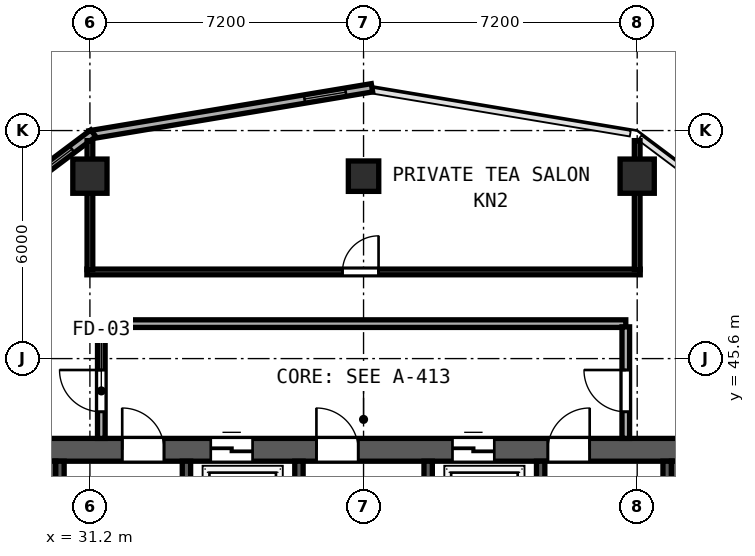
"""IFC4 building model, lengths in metres.
Left out: names, types, materials, properties, quantities, classifications, styles, units other than length and angle.
Written with IfcOpenShell. Run it as: python <this file> out.ifc"""

import sys

from ifc_helpers import new_model, si_unit, direction, frame, frame_2d, origin, origin_2d, place, context, subcontext, project, spatial, rectangle, hollow_rectangle, extrude, element, fill, save


model = new_model("IFC4")
c1 = context("Model", 3, precision=1e-05, world=origin(), true_north=direction((0.0, 1.0)))
c2 = subcontext(c1, "Body", "Model", "MODEL_VIEW")
j1 = project(units=[si_unit("LENGTHUNIT", "METRE"), si_unit("PLANEANGLEUNIT", "RADIAN")], contexts=[c1])
p1 = place(None, origin())
s1 = spatial("IfcSite", under=j1, at=p1, CompositionType="ELEMENT")
p2 = place(p1, origin())
s2 = spatial("IfcBuilding", under=s1, at=p2, CompositionType="ELEMENT")
p3 = place(p2, frame((0.0, 0.0, 199.4)))
s3 = spatial("IfcBuildingStorey", under=s2, at=p3, CompositionType="ELEMENT", Elevation=199.4)
p4 = place(p3, frame((29.7, 43.2, 0.0), z_axis=(0.0, 0.0, 1.0), x_axis=(1.0, 0.0, 0.0)))
e1 = element("IfcWall", 1, at=p4, inside=s3, PredefinedType="SHEAR", context=c2, shape_type="SweptSolid", body=[
    extrude(rectangle(XDim=17.4, YDim=0.6, at=frame_2d((8.7, 0.0))), origin(), (0.0, 0.0, 1.0), 3.62),
])
p5 = place(p4, frame((2.35, 0.0, 0.0)))
e2 = element("IfcOpeningElement", 2, at=p5, cuts=e1, PredefinedType="OPENING", context=c2, shape_type="SweptSolid", body=[
    extrude(rectangle(XDim=1.1, YDim=2.15, at=frame_2d((0.55, 1.075))), frame((0.0, 0.31, 0.0), z_axis=(0.0, -1.0, 0.0), x_axis=(1.0, 0.0, 0.0)), (0.0, 0.0, 1.0), 0.62),
])
p6 = place(p4, frame((7.46, 0.0, 0.0)))
e3 = element("IfcOpeningElement", 3, at=p6, cuts=e1, PredefinedType="OPENING", context=c2, shape_type="SweptSolid", body=[
    extrude(rectangle(XDim=1.1, YDim=2.15, at=frame_2d((0.55, 1.075))), frame((0.0, 0.31, 0.0), z_axis=(0.0, -1.0, 0.0), x_axis=(1.0, 0.0, 0.0)), (0.0, 0.0, 1.0), 0.62),
])
p7 = place(p4, frame((13.55, 0.0, 0.0)))
e4 = element("IfcOpeningElement", 4, at=p7, cuts=e1, PredefinedType="OPENING", context=c2, shape_type="SweptSolid", body=[
    extrude(rectangle(XDim=1.1, YDim=2.15, at=frame_2d((0.55, 1.075))), frame((0.0, 0.31, 0.0), z_axis=(0.0, -1.0, 0.0), x_axis=(1.0, 0.0, 0.0)), (0.0, 0.0, 1.0), 0.62),
])
p8 = place(p4, frame((4.68, 0.0, 0.0)))
e5 = element("IfcOpeningElement", 5, at=p8, cuts=e1, PredefinedType="OPENING", context=c2, shape_type="SweptSolid", body=[
    extrude(rectangle(XDim=1.1, YDim=2.2, at=frame_2d((0.55, 1.1))), frame((0.0, 0.31, 0.0), z_axis=(0.0, -1.0, 0.0), x_axis=(1.0, 0.0, 0.0)), (0.0, 0.0, 1.0), 0.62),
])
p9 = place(p4, frame((11.04, 0.0, 0.0)))
e6 = element("IfcOpeningElement", 6, at=p9, cuts=e1, PredefinedType="OPENING", context=c2, shape_type="SweptSolid", body=[
    extrude(rectangle(XDim=1.1, YDim=2.2, at=frame_2d((0.55, 1.1))), frame((0.0, 0.31, 0.0), z_axis=(0.0, -1.0, 0.0), x_axis=(1.0, 0.0, 0.0)), (0.0, 0.0, 1.0), 0.62),
])
for number, where, z_axis, x_axis in (
    (7, (30.0, 32.8, 0.0), (0.0, 0.0, 1.0), (0.0, 1.0, 0.0)),
    (8, (46.8, 32.8, 0.0), (0.0, 0.0, 1.0), (0.0, 1.0, 0.0)),
):
    element("IfcWall", number, at=place(p3, frame(where, z_axis=z_axis, x_axis=x_axis)), inside=s3, PredefinedType="SHEAR", context=c2, shape_type="SweptSolid", body=[
        extrude(rectangle(XDim=10.1, YDim=0.6, at=frame_2d((5.05, 0.0))), origin(), (0.0, 0.0, 1.0), 3.62),
    ])
for number, where, z_axis, x_axis in (
    (9, (30.412, 35.39, 0.0), (0.0, 0.0, 1.0), (0.0, 1.0, 0.0)),
    (10, (33.74, 35.39, 0.0), (0.0, 0.0, 1.0), (0.0, 1.0, 0.0)),
    (11, (36.7, 35.39, 0.0), (0.0, 0.0, 1.0), (0.0, 1.0, 0.0)),
    (12, (40.1, 35.39, 0.0), (0.0, 0.0, 1.0), (0.0, 1.0, 0.0)),
    (13, (43.06, 35.39, 0.0), (0.0, 0.0, 1.0), (0.0, 1.0, 0.0)),
    (14, (46.388, 35.39, 0.0), (0.0, 0.0, 1.0), (0.0, 1.0, 0.0)),
):
    element("IfcWall", number, at=place(p3, frame(where, z_axis=z_axis, x_axis=x_axis)), inside=s3, PredefinedType="SHEAR", context=c2, shape_type="SweptSolid", body=[
        extrude(rectangle(XDim=7.51, YDim=0.22, at=frame_2d((3.755, 0.0))), origin(), (0.0, 0.0, 1.0), 3.62),
    ])
for number, where, z_axis, x_axis in (
    (15, (31.2, 50.4, 0.0), (0.0, 0.0, 1.0), (1.0, 0.0, 0.0)),
    (16, (45.6, 50.4, 0.0), (0.0, 0.0, 1.0), (1.0, 0.0, 0.0)),
):
    element("IfcColumn", number, at=place(p3, frame(where, z_axis=z_axis, x_axis=x_axis)), inside=s3, PredefinedType="COLUMN", context=c2, shape_type="SweptSolid", body=[
        extrude(hollow_rectangle(XDim=0.9, YDim=0.9, WallThickness=0.034, at=origin_2d()), origin(), (0.0, 0.0, 1.0), 3.8),
    ])
p10 = place(p3, frame((38.4, 50.4, 0.0), z_axis=(0.0, 0.0, 1.0), x_axis=(1.0, 0.0, 0.0)))
e17 = element("IfcColumn", 17, at=p10, inside=s3, PredefinedType="COLUMN", context=c2, shape_type="SweptSolid", body=[
    extrude(hollow_rectangle(XDim=0.8, YDim=0.8, WallThickness=0.03, at=origin_2d()), origin(), (0.0, 0.0, 1.0), 3.8),
])
p11 = place(p3, frame((38.622, 52.726, 0.0), z_axis=(0.0, 0.0, 1.0), x_axis=(-0.986390420428, -0.164420006349, 0.0)))
e18 = element("IfcWall", 18, at=p11, inside=s3, PredefinedType="SOLIDWALL", context=c2, shape_type="SweptSolid", body=[
    extrude(rectangle(XDim=7.534, YDim=0.22, at=frame_2d((3.767, 0.0))), origin(), (0.0, 0.0, 1.0), 3.62),
])
p12 = place(p11, frame((0.7, 0.0, 0.85)))
e19 = element("IfcOpeningElement", 19, at=p12, cuts=e18, PredefinedType="OPENING", context=c2, shape_type="SweptSolid", body=[
    extrude(rectangle(XDim=1.1, YDim=1.75, at=frame_2d((0.55, 0.875))), frame((0.0, 0.12, 0.0), z_axis=(0.0, -1.0, 0.0), x_axis=(1.0, 0.0, 0.0)), (0.0, 0.0, 1.0), 0.24),
])
p13 = place(p3, frame((31.289, 51.529, 0.0), z_axis=(0.0, 0.0, 1.0), x_axis=(-0.800014580093, -0.599980559383, 0.0)))
e20 = element("IfcWall", 20, at=p13, inside=s3, PredefinedType="SOLIDWALL", context=c2, shape_type="SweptSolid", body=[
    extrude(rectangle(XDim=6.028, YDim=0.22, at=frame_2d((3.014, 0.0))), origin(), (0.0, 0.0, 1.0), 3.62),
])
p14 = place(p13, frame((0.7, 0.0, 0.85)))
e21 = element("IfcOpeningElement", 21, at=p14, cuts=e20, PredefinedType="OPENING", context=c2, shape_type="SweptSolid", body=[
    extrude(rectangle(XDim=1.1, YDim=1.75, at=frame_2d((0.55, 0.875))), frame((0.0, 0.12, 0.0), z_axis=(0.0, -1.0, 0.0), x_axis=(1.0, 0.0, 0.0)), (0.0, 0.0, 1.0), 0.24),
])
p15 = place(p3, frame((31.5, 46.52, 0.0), z_axis=(0.0, 0.0, 1.0), x_axis=(1.0, 0.0, 0.0)))
e22 = element("IfcWall", 22, at=p15, inside=s3, PredefinedType="SOLIDWALL", context=c2, shape_type="SweptSolid", body=[
    extrude(rectangle(XDim=13.8, YDim=0.2, at=frame_2d((6.9, 0.0))), origin(), (0.0, 0.0, 1.0), 3.62),
])
p16 = place(p3, frame((31.5, 43.5, 0.0), z_axis=(0.0, 0.0, 1.0), x_axis=(0.0, 1.0, 0.0)))
e23 = element("IfcWall", 23, at=p16, inside=s3, PredefinedType="SOLIDWALL", context=c2, shape_type="SweptSolid", body=[
    extrude(rectangle(XDim=2.935, YDim=0.2, at=frame_2d((1.468, 0.0))), origin(), (0.0, 0.0, 1.0), 3.62),
])
p17 = place(p16, frame((1.8, 0.0, 0.0), z_axis=(0.0, 0.0, 1.0), x_axis=(-1.0, 0.0, 0.0)))
e24 = element("IfcOpeningElement", 24, at=p17, cuts=e23, PredefinedType="OPENING", context=c2, shape_type="SweptSolid", body=[
    extrude(rectangle(XDim=1.1, YDim=2.15, at=frame_2d((0.55, 1.075))), frame((0.0, 0.11, 0.0), z_axis=(0.0, -1.0, 0.0), x_axis=(1.0, 0.0, 0.0)), (0.0, 0.0, 1.0), 0.22),
])
p18 = place(p3, frame((45.3, 43.5, 0.0), z_axis=(0.0, 0.0, 1.0), x_axis=(0.0, 1.0, 0.0)))
e25 = element("IfcWall", 25, at=p18, inside=s3, PredefinedType="SOLIDWALL", context=c2, shape_type="SweptSolid", body=[
    extrude(rectangle(XDim=2.935, YDim=0.2, at=frame_2d((1.468, 0.0))), origin(), (0.0, 0.0, 1.0), 3.62),
])
p19 = place(p18, frame((0.7, 0.0, 0.0)))
e26 = element("IfcOpeningElement", 26, at=p19, cuts=e25, PredefinedType="OPENING", context=c2, shape_type="SweptSolid", body=[
    extrude(rectangle(XDim=1.1, YDim=2.15, at=frame_2d((0.55, 1.075))), frame((0.0, 0.11, 0.0), z_axis=(0.0, -1.0, 0.0), x_axis=(1.0, 0.0, 0.0)), (0.0, 0.0, 1.0), 0.22),
])
p20 = place(p3, frame((31.12, 47.88, 0.0), z_axis=(0.0, 0.0, 1.0), x_axis=(1.0, 0.0, 0.0)))
e27 = element("IfcWall", 27, at=p20, inside=s3, PredefinedType="PARTITIONING", context=c2, shape_type="SweptSolid", body=[
    extrude(rectangle(XDim=14.56, YDim=0.15, at=frame_2d((7.28, 0.0))), origin(), (0.0, 0.0, 1.0), 3.62),
])
p21 = place(p20, frame((6.725, 0.0, 0.0)))
e28 = element("IfcOpeningElement", 28, at=p21, cuts=e27, PredefinedType="OPENING", context=c2, shape_type="SweptSolid", body=[
    extrude(rectangle(XDim=0.95, YDim=2.12, at=frame_2d((0.475, 1.06))), frame((0.0, 0.085, 0.0), z_axis=(0.0, -1.0, 0.0), x_axis=(1.0, 0.0, 0.0)), (0.0, 0.0, 1.0), 0.17),
])
for number, where, z_axis, x_axis in (
    (29, (31.2, 47.94, 0.0), (0.0, 0.0, 1.0), (0.0, 1.0, 0.0)),
    (30, (45.6, 47.94, 0.0), (0.0, 0.0, 1.0), (0.0, 1.0, 0.0)),
):
    element("IfcWall", number, at=place(p3, frame(where, z_axis=z_axis, x_axis=x_axis)), inside=s3, PredefinedType="PARTITIONING", context=c2, shape_type="SweptSolid", body=[
        extrude(rectangle(XDim=3.395, YDim=0.15, at=frame_2d((1.698, 0.0))), origin(), (0.0, 0.0, 1.0), 3.105),
    ])
p22 = place(p12, origin())
e31 = element("IfcWindow", 31, at=p22, inside=s3, PartitioningType="SINGLE_PANEL", PredefinedType="WINDOW", context=c2, shape_type="SweptSolid", body=[
    extrude(rectangle(XDim=1.1, YDim=1.75, at=frame_2d((0.55, 0.875))), frame((0.0, 0.03, 0.0), z_axis=(0.0, -1.0, 0.0), x_axis=(1.0, 0.0, 0.0)), (0.0, 0.0, 1.0), 0.06),
])
fill(e19, e31)
p23 = place(p14, origin())
e32 = element("IfcWindow", 32, at=p23, inside=s3, PartitioningType="SINGLE_PANEL", PredefinedType="WINDOW", context=c2, shape_type="SweptSolid", body=[
    extrude(rectangle(XDim=1.1, YDim=1.75, at=frame_2d((0.55, 0.875))), frame((0.0, 0.03, 0.0), z_axis=(0.0, -1.0, 0.0), x_axis=(1.0, 0.0, 0.0)), (0.0, 0.0, 1.0), 0.06),
])
fill(e21, e32)
p24 = place(p5, origin())
e33 = element("IfcDoor", 33, at=p24, inside=s3, OperationType="SINGLE_SWING_LEFT", PredefinedType="DOOR", context=c2, shape_type="SweptSolid", body=[
    extrude(rectangle(XDim=1.1, YDim=2.15, at=frame_2d((0.55, 1.075))), frame((0.0, 0.185, 0.0), z_axis=(0.0, -1.0, 0.0), x_axis=(1.0, 0.0, 0.0)), (0.0, 0.0, 1.0), 0.05),
])
fill(e2, e33)
p25 = place(p6, origin())
e34 = element("IfcDoor", 34, at=p25, inside=s3, OperationType="SINGLE_SWING_LEFT", PredefinedType="DOOR", context=c2, shape_type="SweptSolid", body=[
    extrude(rectangle(XDim=1.1, YDim=2.15, at=frame_2d((0.55, 1.075))), frame((0.0, 0.185, 0.0), z_axis=(0.0, -1.0, 0.0), x_axis=(1.0, 0.0, 0.0)), (0.0, 0.0, 1.0), 0.05),
])
fill(e3, e34)
p26 = place(p7, origin())
e35 = element("IfcDoor", 35, at=p26, inside=s3, OperationType="SINGLE_SWING_RIGHT", PredefinedType="DOOR", context=c2, shape_type="SweptSolid", body=[
    extrude(rectangle(XDim=1.1, YDim=2.15, at=frame_2d((0.55, 1.075))), frame((0.0, 0.185, 0.0), z_axis=(0.0, -1.0, 0.0), x_axis=(1.0, 0.0, 0.0)), (0.0, 0.0, 1.0), 0.05),
])
fill(e4, e35)
p27 = place(p17, origin())
e36 = element("IfcDoor", 36, at=p27, inside=s3, OperationType="SINGLE_SWING_LEFT", PredefinedType="DOOR", context=c2, shape_type="SweptSolid", body=[
    extrude(rectangle(XDim=1.1, YDim=2.15, at=frame_2d((0.55, 1.075))), frame((0.0, 0.025, 0.0), z_axis=(0.0, -1.0, 0.0), x_axis=(1.0, 0.0, 0.0)), (0.0, 0.0, 1.0), 0.05),
])
fill(e24, e36)
p28 = place(p19, origin())
e37 = element("IfcDoor", 37, at=p28, inside=s3, OperationType="SINGLE_SWING_RIGHT", PredefinedType="DOOR", context=c2, shape_type="SweptSolid", body=[
    extrude(rectangle(XDim=1.1, YDim=2.15, at=frame_2d((0.55, 1.075))), frame((0.0, 0.025, 0.0), z_axis=(0.0, -1.0, 0.0), x_axis=(1.0, 0.0, 0.0)), (0.0, 0.0, 1.0), 0.05),
])
fill(e26, e37)
p29 = place(p8, origin())
e38 = element("IfcDoor", 38, at=p29, inside=s3, OperationType="SLIDING_TO_LEFT", PredefinedType="DOOR", context=c2, shape_type="SweptSolid", body=[
    extrude(rectangle(XDim=1.1, YDim=2.2, at=frame_2d((0.55, 1.1))), frame((0.0, 0.185, 0.0), z_axis=(0.0, -1.0, 0.0), x_axis=(1.0, 0.0, 0.0)), (0.0, 0.0, 1.0), 0.05),
])
fill(e5, e38)
p30 = place(p9, origin())
e39 = element("IfcDoor", 39, at=p30, inside=s3, OperationType="SLIDING_TO_LEFT", PredefinedType="DOOR", context=c2, shape_type="SweptSolid", body=[
    extrude(rectangle(XDim=1.1, YDim=2.2, at=frame_2d((0.55, 1.1))), frame((0.0, 0.185, 0.0), z_axis=(0.0, -1.0, 0.0), x_axis=(1.0, 0.0, 0.0)), (0.0, 0.0, 1.0), 0.05),
])
fill(e6, e39)
p31 = place(p21, origin())
e40 = element("IfcDoor", 40, at=p31, inside=s3, OperationType="SINGLE_SWING_RIGHT", PredefinedType="DOOR", context=c2, shape_type="SweptSolid", body=[
    extrude(rectangle(XDim=0.95, YDim=2.12, at=frame_2d((0.475, 1.06))), frame((0.0, 0.025, 0.0), z_axis=(0.0, -1.0, 0.0), x_axis=(1.0, 0.0, 0.0)), (0.0, 0.0, 1.0), 0.05),
])
fill(e28, e40)
save(model, sys.argv[1])
